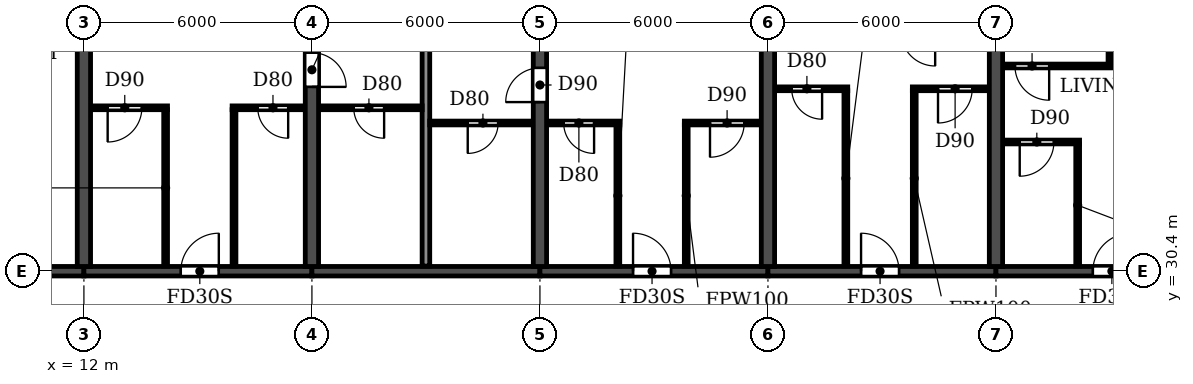
"""IFC4 building model, lengths in metres.
Left out: names, types, materials, properties, quantities, classifications, styles, units other than length and angle.
Written with IfcOpenShell. Run it as: python <this file> out.ifc"""

import sys

from ifc_helpers import new_model, si_unit, direction, frame, frame_2d, origin, place, context, subcontext, project, spatial, rectangle, extrude, element, fill, save


model = new_model("IFC4")
c1 = context("Model", 3, precision=1e-05, world=origin(), true_north=direction((0.0, 1.0)))
c2 = subcontext(c1, "Body", "Model", "MODEL_VIEW")
j1 = project(units=[si_unit("LENGTHUNIT", "METRE"), si_unit("PLANEANGLEUNIT", "RADIAN")], contexts=[c1])
p1 = place(None, origin())
s1 = spatial("IfcSite", under=j1, at=p1, CompositionType="ELEMENT")
p2 = place(p1, origin())
s2 = spatial("IfcBuilding", under=s1, at=p2, CompositionType="ELEMENT")
p3 = place(p2, frame((0.0, 0.0, 82.8)))
s3 = spatial("IfcBuildingStorey", under=s2, at=p3, CompositionType="ELEMENT", Elevation=82.8)
p4 = place(p3, frame((12.0, 30.525, 0.0), z_axis=(0.0, 0.0, 1.0), x_axis=(0.0, 1.0, 0.0)))
e1 = element("IfcWall", 1, at=p4, inside=s3, PredefinedType="SHEAR", context=c2, shape_type="SweptSolid", body=[
    extrude(rectangle(XDim=12.875, YDim=0.35, at=frame_2d((6.438, 0.0))), origin(), (0.0, 0.0, 1.0), 3.06),
])
p5 = place(p3, frame((18.0, 30.525, 0.0), z_axis=(0.0, 0.0, 1.0), x_axis=(0.0, 1.0, 0.0)))
e2 = element("IfcWall", 2, at=p5, inside=s3, PredefinedType="SHEAR", context=c2, shape_type="SweptSolid", body=[
    extrude(rectangle(XDim=12.875, YDim=0.35, at=frame_2d((6.438, 0.0))), origin(), (0.0, 0.0, 1.0), 3.06),
])
p6 = place(p5, frame((4.725, 0.0, 0.0)))
e3 = element("IfcOpeningElement", 3, at=p6, cuts=e2, PredefinedType="OPENING", context=c2, shape_type="SweptSolid", body=[
    extrude(rectangle(XDim=0.9, YDim=2.1, at=frame_2d((0.45, 1.05))), frame((0.0, 0.185, 0.0), z_axis=(0.0, -1.0, 0.0), x_axis=(1.0, 0.0, 0.0)), (0.0, 0.0, 1.0), 0.37),
])
p7 = place(p3, frame((24.0, 30.525, 0.0), z_axis=(0.0, 0.0, 1.0), x_axis=(0.0, 1.0, 0.0)))
e4 = element("IfcWall", 4, at=p7, inside=s3, PredefinedType="SHEAR", context=c2, shape_type="SweptSolid", body=[
    extrude(rectangle(XDim=12.875, YDim=0.35, at=frame_2d((6.438, 0.0))), origin(), (0.0, 0.0, 1.0), 3.06),
])
p8 = place(p7, frame((4.325, 0.0, 0.0)))
e5 = element("IfcOpeningElement", 5, at=p8, cuts=e4, PredefinedType="OPENING", context=c2, shape_type="SweptSolid", body=[
    extrude(rectangle(XDim=0.9, YDim=2.1, at=frame_2d((0.45, 1.05))), frame((0.0, 0.185, 0.0), z_axis=(0.0, -1.0, 0.0), x_axis=(1.0, 0.0, 0.0)), (0.0, 0.0, 1.0), 0.37),
])
for number, where, z_axis, x_axis in (
    (6, (30.0, 30.525, 0.0), (0.0, 0.0, 1.0), (0.0, 1.0, 0.0)),
    (7, (36.0, 30.525, 0.0), (0.0, 0.0, 1.0), (0.0, 1.0, 0.0)),
):
    element("IfcWall", number, at=place(p3, frame(where, z_axis=z_axis, x_axis=x_axis)), inside=s3, PredefinedType="SHEAR", context=c2, shape_type="SweptSolid", body=[
        extrude(rectangle(XDim=12.875, YDim=0.35, at=frame_2d((6.438, 0.0))), origin(), (0.0, 0.0, 1.0), 3.06),
    ])
p9 = place(p3, frame((6.2, 30.4, 0.0), z_axis=(0.0, 0.0, 1.0), x_axis=(1.0, 0.0, 0.0)))
e8 = element("IfcWall", 8, at=p9, inside=s3, PredefinedType="SHEAR", context=c2, shape_type="SweptSolid", body=[
    extrude(rectangle(XDim=5.8, YDim=0.25, at=frame_2d((2.9, 0.0))), origin(), (0.0, 0.0, 1.0), 2.46),
])
p10 = place(p9, frame((2.3, 0.0, 0.0)))
e9 = element("IfcOpeningElement", 9, at=p10, cuts=e8, PredefinedType="OPENING", context=c2, shape_type="SweptSolid", body=[
    extrude(rectangle(XDim=1.0, YDim=2.1, at=frame_2d((0.5, 1.05))), frame((0.0, 0.135, 0.0), z_axis=(0.0, -1.0, 0.0), x_axis=(1.0, 0.0, 0.0)), (0.0, 0.0, 1.0), 0.27),
])
p11 = place(p3, frame((12.0, 30.4, 0.0), z_axis=(0.0, 0.0, 1.0), x_axis=(1.0, 0.0, 0.0)))
e10 = element("IfcWall", 10, at=p11, inside=s3, PredefinedType="SHEAR", context=c2, shape_type="SweptSolid", body=[
    extrude(rectangle(XDim=6.0, YDim=0.25, at=frame_2d((3.0, 0.0))), origin(), (0.0, 0.0, 1.0), 2.46),
])
p12 = place(p11, frame((2.55, 0.0, 0.0)))
e11 = element("IfcOpeningElement", 11, at=p12, cuts=e10, PredefinedType="OPENING", context=c2, shape_type="SweptSolid", body=[
    extrude(rectangle(XDim=1.0, YDim=2.1, at=frame_2d((0.5, 1.05))), frame((0.0, 0.135, 0.0), z_axis=(0.0, -1.0, 0.0), x_axis=(1.0, 0.0, 0.0)), (0.0, 0.0, 1.0), 0.27),
])
p13 = place(p3, frame((18.0, 30.4, 0.0), z_axis=(0.0, 0.0, 1.0), x_axis=(1.0, 0.0, 0.0)))
e12 = element("IfcWall", 12, at=p13, inside=s3, PredefinedType="SHEAR", context=c2, shape_type="SweptSolid", body=[
    extrude(rectangle(XDim=6.0, YDim=0.25, at=frame_2d((3.0, 0.0))), origin(), (0.0, 0.0, 1.0), 2.46),
])
p14 = place(p3, frame((24.0, 30.4, 0.0), z_axis=(0.0, 0.0, 1.0), x_axis=(1.0, 0.0, 0.0)))
e13 = element("IfcWall", 13, at=p14, inside=s3, PredefinedType="SHEAR", context=c2, shape_type="SweptSolid", body=[
    extrude(rectangle(XDim=6.0, YDim=0.25, at=frame_2d((3.0, 0.0))), origin(), (0.0, 0.0, 1.0), 2.46),
])
p15 = place(p14, frame((2.45, 0.0, 0.0)))
e14 = element("IfcOpeningElement", 14, at=p15, cuts=e13, PredefinedType="OPENING", context=c2, shape_type="SweptSolid", body=[
    extrude(rectangle(XDim=1.0, YDim=2.1, at=frame_2d((0.5, 1.05))), frame((0.0, 0.135, 0.0), z_axis=(0.0, -1.0, 0.0), x_axis=(1.0, 0.0, 0.0)), (0.0, 0.0, 1.0), 0.27),
])
p16 = place(p3, frame((30.0, 30.4, 0.0), z_axis=(0.0, 0.0, 1.0), x_axis=(1.0, 0.0, 0.0)))
e15 = element("IfcWall", 15, at=p16, inside=s3, PredefinedType="SHEAR", context=c2, shape_type="SweptSolid", body=[
    extrude(rectangle(XDim=6.0, YDim=0.25, at=frame_2d((3.0, 0.0))), origin(), (0.0, 0.0, 1.0), 2.46),
])
p17 = place(p16, frame((2.45, 0.0, 0.0)))
e16 = element("IfcOpeningElement", 16, at=p17, cuts=e15, PredefinedType="OPENING", context=c2, shape_type="SweptSolid", body=[
    extrude(rectangle(XDim=1.0, YDim=2.1, at=frame_2d((0.5, 1.05))), frame((0.0, 0.135, 0.0), z_axis=(0.0, -1.0, 0.0), x_axis=(1.0, 0.0, 0.0)), (0.0, 0.0, 1.0), 0.27),
])
p18 = place(p3, frame((36.0, 30.4, 0.0), z_axis=(0.0, 0.0, 1.0), x_axis=(1.0, 0.0, 0.0)))
e17 = element("IfcWall", 17, at=p18, inside=s3, PredefinedType="SHEAR", context=c2, shape_type="SweptSolid", body=[
    extrude(rectangle(XDim=6.0, YDim=0.25, at=frame_2d((3.0, 0.0))), origin(), (0.0, 0.0, 1.0), 2.46),
])
p19 = place(p18, frame((2.55, 0.0, 0.0)))
e18 = element("IfcOpeningElement", 18, at=p19, cuts=e17, PredefinedType="OPENING", context=c2, shape_type="SweptSolid", body=[
    extrude(rectangle(XDim=1.0, YDim=2.1, at=frame_2d((0.5, 1.05))), frame((0.0, 0.135, 0.0), z_axis=(0.0, -1.0, 0.0), x_axis=(1.0, 0.0, 0.0)), (0.0, 0.0, 1.0), 0.27),
])
p20 = place(p3, frame((21.0, 30.535, 0.0), z_axis=(0.0, 0.0, 1.0), x_axis=(0.0, 1.0, 0.0)))
e19 = element("IfcWall", 19, at=p20, inside=s3, PredefinedType="PARTITIONING", context=c2, shape_type="SweptSolid", body=[
    extrude(rectangle(XDim=13.005, YDim=0.2, at=frame_2d((6.502, 0.0))), origin(), (0.0, 0.0, 1.0), 3.06),
])
p21 = place(p3, frame((36.185, 33.8, 0.0), z_axis=(0.0, 0.0, 1.0), x_axis=(1.0, 0.0, 0.0)))
e20 = element("IfcWall", 20, at=p21, inside=s3, PredefinedType="PARTITIONING", context=c2, shape_type="SweptSolid", body=[
    extrude(rectangle(XDim=2.015, YDim=0.1, at=frame_2d((1.007, 0.0))), origin(), (0.0, 0.0, 1.0), 3.06),
])
p22 = place(p21, frame((0.44, 0.0, 0.0)))
e21 = element("IfcOpeningElement", 21, at=p22, cuts=e20, PredefinedType="OPENING", context=c2, shape_type="SweptSolid", body=[
    extrude(rectangle(XDim=0.9, YDim=2.1, at=frame_2d((0.45, 1.05))), frame((0.0, 0.06, 0.0), z_axis=(0.0, -1.0, 0.0), x_axis=(1.0, 0.0, 0.0)), (0.0, 0.0, 1.0), 0.12),
])
p23 = place(p3, frame((21.1, 34.3, 0.0), z_axis=(0.0, 0.0, 1.0), x_axis=(1.0, 0.0, 0.0)))
e22 = element("IfcWall", 22, at=p23, inside=s3, PredefinedType="PARTITIONING", context=c2, shape_type="SweptSolid", body=[
    extrude(rectangle(XDim=2.715, YDim=0.1, at=frame_2d((1.357, 0.0))), origin(), (0.0, 0.0, 1.0), 3.06),
])
p24 = place(p23, frame((1.0, 0.0, 0.0)))
e23 = element("IfcOpeningElement", 23, at=p24, cuts=e22, PredefinedType="OPENING", context=c2, shape_type="SweptSolid", body=[
    extrude(rectangle(XDim=0.8, YDim=2.1, at=frame_2d((0.4, 1.05))), frame((0.0, 0.06, 0.0), z_axis=(0.0, -1.0, 0.0), x_axis=(1.0, 0.0, 0.0)), (0.0, 0.0, 1.0), 0.12),
])
p25 = place(p3, frame((24.185, 34.3, 0.0), z_axis=(0.0, 0.0, 1.0), x_axis=(1.0, 0.0, 0.0)))
e24 = element("IfcWall", 24, at=p25, inside=s3, PredefinedType="PARTITIONING", context=c2, shape_type="SweptSolid", body=[
    extrude(rectangle(XDim=1.915, YDim=0.1, at=frame_2d((0.958, 0.0))), origin(), (0.0, 0.0, 1.0), 3.06),
])
p26 = place(p25, frame((0.44, 0.0, 0.0)))
e25 = element("IfcOpeningElement", 25, at=p26, cuts=e24, PredefinedType="OPENING", context=c2, shape_type="SweptSolid", body=[
    extrude(rectangle(XDim=0.8, YDim=2.1, at=frame_2d((0.4, 1.05))), frame((0.0, 0.06, 0.0), z_axis=(0.0, -1.0, 0.0), x_axis=(1.0, 0.0, 0.0)), (0.0, 0.0, 1.0), 0.12),
])
p27 = place(p3, frame((27.8, 34.3, 0.0), z_axis=(0.0, 0.0, 1.0), x_axis=(1.0, 0.0, 0.0)))
e26 = element("IfcWall", 26, at=p27, inside=s3, PredefinedType="PARTITIONING", context=c2, shape_type="SweptSolid", body=[
    extrude(rectangle(XDim=2.015, YDim=0.1, at=frame_2d((1.007, 0.0))), origin(), (0.0, 0.0, 1.0), 3.06),
])
p28 = place(p27, frame((0.675, 0.0, 0.0)))
e27 = element("IfcOpeningElement", 27, at=p28, cuts=e26, PredefinedType="OPENING", context=c2, shape_type="SweptSolid", body=[
    extrude(rectangle(XDim=0.9, YDim=2.1, at=frame_2d((0.45, 1.05))), frame((0.0, 0.06, 0.0), z_axis=(0.0, -1.0, 0.0), x_axis=(1.0, 0.0, 0.0)), (0.0, 0.0, 1.0), 0.12),
])
p29 = place(p3, frame((12.185, 34.7, 0.0), z_axis=(0.0, 0.0, 1.0), x_axis=(1.0, 0.0, 0.0)))
e28 = element("IfcWall", 28, at=p29, inside=s3, PredefinedType="PARTITIONING", context=c2, shape_type="SweptSolid", body=[
    extrude(rectangle(XDim=2.015, YDim=0.1, at=frame_2d((1.007, 0.0))), origin(), (0.0, 0.0, 1.0), 3.06),
])
p30 = place(p29, frame((0.44, 0.0, 0.0)))
e29 = element("IfcOpeningElement", 29, at=p30, cuts=e28, PredefinedType="OPENING", context=c2, shape_type="SweptSolid", body=[
    extrude(rectangle(XDim=0.9, YDim=2.1, at=frame_2d((0.45, 1.05))), frame((0.0, 0.06, 0.0), z_axis=(0.0, -1.0, 0.0), x_axis=(1.0, 0.0, 0.0)), (0.0, 0.0, 1.0), 0.12),
])
p31 = place(p3, frame((15.9, 34.7, 0.0), z_axis=(0.0, 0.0, 1.0), x_axis=(1.0, 0.0, 0.0)))
e30 = element("IfcWall", 30, at=p31, inside=s3, PredefinedType="PARTITIONING", context=c2, shape_type="SweptSolid", body=[
    extrude(rectangle(XDim=1.915, YDim=0.1, at=frame_2d((0.958, 0.0))), origin(), (0.0, 0.0, 1.0), 3.06),
])
p32 = place(p31, frame((0.675, 0.0, 0.0)))
e31 = element("IfcOpeningElement", 31, at=p32, cuts=e30, PredefinedType="OPENING", context=c2, shape_type="SweptSolid", body=[
    extrude(rectangle(XDim=0.8, YDim=2.1, at=frame_2d((0.4, 1.05))), frame((0.0, 0.06, 0.0), z_axis=(0.0, -1.0, 0.0), x_axis=(1.0, 0.0, 0.0)), (0.0, 0.0, 1.0), 0.12),
])
p33 = place(p3, frame((18.185, 34.7, 0.0), z_axis=(0.0, 0.0, 1.0), x_axis=(1.0, 0.0, 0.0)))
e32 = element("IfcWall", 32, at=p33, inside=s3, PredefinedType="PARTITIONING", context=c2, shape_type="SweptSolid", body=[
    extrude(rectangle(XDim=2.715, YDim=0.1, at=frame_2d((1.357, 0.0))), origin(), (0.0, 0.0, 1.0), 3.06),
])
p34 = place(p33, frame((0.915, 0.0, 0.0)))
e33 = element("IfcOpeningElement", 33, at=p34, cuts=e32, PredefinedType="OPENING", context=c2, shape_type="SweptSolid", body=[
    extrude(rectangle(XDim=0.8, YDim=2.1, at=frame_2d((0.4, 1.05))), frame((0.0, 0.06, 0.0), z_axis=(0.0, -1.0, 0.0), x_axis=(1.0, 0.0, 0.0)), (0.0, 0.0, 1.0), 0.12),
])
p35 = place(p3, frame((30.185, 35.2, 0.0), z_axis=(0.0, 0.0, 1.0), x_axis=(1.0, 0.0, 0.0)))
e34 = element("IfcWall", 34, at=p35, inside=s3, PredefinedType="PARTITIONING", context=c2, shape_type="SweptSolid", body=[
    extrude(rectangle(XDim=1.915, YDim=0.1, at=frame_2d((0.958, 0.0))), origin(), (0.0, 0.0, 1.0), 3.06),
])
p36 = place(p35, frame((0.44, 0.0, 0.0)))
e35 = element("IfcOpeningElement", 35, at=p36, cuts=e34, PredefinedType="OPENING", context=c2, shape_type="SweptSolid", body=[
    extrude(rectangle(XDim=0.8, YDim=2.1, at=frame_2d((0.4, 1.05))), frame((0.0, 0.06, 0.0), z_axis=(0.0, -1.0, 0.0), x_axis=(1.0, 0.0, 0.0)), (0.0, 0.0, 1.0), 0.12),
])
p37 = place(p3, frame((33.8, 35.2, 0.0), z_axis=(0.0, 0.0, 1.0), x_axis=(1.0, 0.0, 0.0)))
e36 = element("IfcWall", 36, at=p37, inside=s3, PredefinedType="PARTITIONING", context=c2, shape_type="SweptSolid", body=[
    extrude(rectangle(XDim=2.015, YDim=0.1, at=frame_2d((1.007, 0.0))), origin(), (0.0, 0.0, 1.0), 3.06),
])
p38 = place(p37, frame((0.675, 0.0, 0.0)))
e37 = element("IfcOpeningElement", 37, at=p38, cuts=e36, PredefinedType="OPENING", context=c2, shape_type="SweptSolid", body=[
    extrude(rectangle(XDim=0.9, YDim=2.1, at=frame_2d((0.45, 1.05))), frame((0.0, 0.06, 0.0), z_axis=(0.0, -1.0, 0.0), x_axis=(1.0, 0.0, 0.0)), (0.0, 0.0, 1.0), 0.12),
])
p39 = place(p3, frame((36.185, 35.8, 0.0), z_axis=(0.0, 0.0, 1.0), x_axis=(1.0, 0.0, 0.0)))
e38 = element("IfcWall", 38, at=p39, inside=s3, PredefinedType="PARTITIONING", context=c2, shape_type="SweptSolid", body=[
    extrude(rectangle(XDim=2.865, YDim=0.1, at=frame_2d((1.433, 0.0))), origin(), (0.0, 0.0, 1.0), 3.06),
])
p40 = place(p39, frame((0.315, 0.0, 0.0)))
e39 = element("IfcOpeningElement", 39, at=p40, cuts=e38, PredefinedType="OPENING", context=c2, shape_type="SweptSolid", body=[
    extrude(rectangle(XDim=0.9, YDim=2.1, at=frame_2d((0.45, 1.05))), frame((0.0, 0.06, 0.0), z_axis=(0.0, -1.0, 0.0), x_axis=(1.0, 0.0, 0.0)), (0.0, 0.0, 1.0), 0.12),
])
for number, where, z_axis, x_axis in (
    (40, (14.15, 30.535, 0.0), (0.0, 0.0, 1.0), (0.0, 1.0, 0.0)),
    (41, (15.95, 30.535, 0.0), (0.0, 0.0, 1.0), (0.0, 1.0, 0.0)),
):
    element("IfcWall", number, at=place(p3, frame(where, z_axis=z_axis, x_axis=x_axis)), inside=s3, PredefinedType="PARTITIONING", context=c2, shape_type="SweptSolid", body=[
        extrude(rectangle(XDim=4.115, YDim=0.1, at=frame_2d((2.058, 0.0))), origin(), (0.0, 0.0, 1.0), 3.06),
    ])
for number, where, z_axis, x_axis in (
    (42, (26.05, 30.535, 0.0), (0.0, 0.0, 1.0), (0.0, 1.0, 0.0)),
    (43, (27.85, 30.535, 0.0), (0.0, 0.0, 1.0), (0.0, 1.0, 0.0)),
):
    element("IfcWall", number, at=place(p3, frame(where, z_axis=z_axis, x_axis=x_axis)), inside=s3, PredefinedType="PARTITIONING", context=c2, shape_type="SweptSolid", body=[
        extrude(rectangle(XDim=3.715, YDim=0.1, at=frame_2d((1.857, 0.0))), origin(), (0.0, 0.0, 1.0), 3.06),
    ])
for number, where, z_axis, x_axis in (
    (44, (32.05, 30.535, 0.0), (0.0, 0.0, 1.0), (0.0, 1.0, 0.0)),
    (45, (33.85, 30.535, 0.0), (0.0, 0.0, 1.0), (0.0, 1.0, 0.0)),
):
    element("IfcWall", number, at=place(p3, frame(where, z_axis=z_axis, x_axis=x_axis)), inside=s3, PredefinedType="PARTITIONING", context=c2, shape_type="SweptSolid", body=[
        extrude(rectangle(XDim=4.615, YDim=0.1, at=frame_2d((2.308, 0.0))), origin(), (0.0, 0.0, 1.0), 3.06),
    ])
p41 = place(p3, frame((38.15, 30.535, 0.0), z_axis=(0.0, 0.0, 1.0), x_axis=(0.0, 1.0, 0.0)))
e46 = element("IfcWall", 46, at=p41, inside=s3, PredefinedType="PARTITIONING", context=c2, shape_type="SweptSolid", body=[
    extrude(rectangle(XDim=3.215, YDim=0.1, at=frame_2d((1.607, 0.0))), origin(), (0.0, 0.0, 1.0), 3.06),
])
p42 = place(p3, frame((39.0, 35.85, 0.0), z_axis=(0.0, 0.0, 1.0), x_axis=(0.0, 1.0, 0.0)))
e47 = element("IfcWall", 47, at=p42, inside=s3, PredefinedType="PARTITIONING", context=c2, shape_type="SweptSolid", body=[
    extrude(rectangle(XDim=7.69, YDim=0.1, at=frame_2d((3.845, 0.0))), origin(), (0.0, 0.0, 1.0), 3.06),
])
p43 = place(p34, frame((0.8, 0.0, 0.0), z_axis=(0.0, 0.0, 1.0), x_axis=(-1.0, 0.0, 0.0)))
e48 = element("IfcDoor", 48, at=p43, inside=s3, OperationType="SINGLE_SWING_LEFT", PredefinedType="DOOR", context=c2, shape_type="SweptSolid", body=[
    extrude(rectangle(XDim=0.8, YDim=2.1, at=frame_2d((0.4, 1.05))), frame((0.0, 0.025, 0.0), z_axis=(0.0, -1.0, 0.0), x_axis=(1.0, 0.0, 0.0)), (0.0, 0.0, 1.0), 0.05),
])
fill(e33, e48)
p44 = place(p30, frame((0.9, 0.0, 0.0), z_axis=(0.0, 0.0, 1.0), x_axis=(-1.0, 0.0, 0.0)))
e49 = element("IfcDoor", 49, at=p44, inside=s3, OperationType="SINGLE_SWING_RIGHT", PredefinedType="DOOR", context=c2, shape_type="SweptSolid", body=[
    extrude(rectangle(XDim=0.9, YDim=2.1, at=frame_2d((0.45, 1.05))), frame((0.0, 0.025, 0.0), z_axis=(0.0, -1.0, 0.0), x_axis=(1.0, 0.0, 0.0)), (0.0, 0.0, 1.0), 0.05),
])
fill(e29, e49)
p45 = place(p12, origin())
e50 = element("IfcDoor", 50, at=p45, inside=s3, OperationType="SINGLE_SWING_RIGHT", PredefinedType="DOOR", context=c2, shape_type="SweptSolid", body=[
    extrude(rectangle(XDim=1.0, YDim=2.1, at=frame_2d((0.5, 1.05))), frame((0.0, 0.025, 0.0), z_axis=(0.0, -1.0, 0.0), x_axis=(1.0, 0.0, 0.0)), (0.0, 0.0, 1.0), 0.05),
])
fill(e11, e50)
p46 = place(p32, frame((0.8, 0.0, 0.0), z_axis=(0.0, 0.0, 1.0), x_axis=(-1.0, 0.0, 0.0)))
e51 = element("IfcDoor", 51, at=p46, inside=s3, OperationType="SINGLE_SWING_LEFT", PredefinedType="DOOR", context=c2, shape_type="SweptSolid", body=[
    extrude(rectangle(XDim=0.8, YDim=2.1, at=frame_2d((0.4, 1.05))), frame((0.0, 0.025, 0.0), z_axis=(0.0, -1.0, 0.0), x_axis=(1.0, 0.0, 0.0)), (0.0, 0.0, 1.0), 0.05),
])
fill(e31, e51)
p47 = place(p6, frame((0.9, 0.0, 0.0), z_axis=(0.0, 0.0, 1.0), x_axis=(-1.0, 0.0, 0.0)))
e52 = element("IfcDoor", 52, at=p47, inside=s3, OperationType="SINGLE_SWING_RIGHT", PredefinedType="DOOR", context=c2, shape_type="SweptSolid", body=[
    extrude(rectangle(XDim=0.9, YDim=2.1, at=frame_2d((0.45, 1.05))), frame((0.0, 0.025, 0.0), z_axis=(0.0, -1.0, 0.0), x_axis=(1.0, 0.0, 0.0)), (0.0, 0.0, 1.0), 0.05),
])
fill(e3, e52)
p48 = place(p24, frame((0.8, 0.0, 0.0), z_axis=(0.0, 0.0, 1.0), x_axis=(-1.0, 0.0, 0.0)))
e53 = element("IfcDoor", 53, at=p48, inside=s3, OperationType="SINGLE_SWING_RIGHT", PredefinedType="DOOR", context=c2, shape_type="SweptSolid", body=[
    extrude(rectangle(XDim=0.8, YDim=2.1, at=frame_2d((0.4, 1.05))), frame((0.0, 0.025, 0.0), z_axis=(0.0, -1.0, 0.0), x_axis=(1.0, 0.0, 0.0)), (0.0, 0.0, 1.0), 0.05),
])
fill(e23, e53)
p49 = place(p8, origin())
e54 = element("IfcDoor", 54, at=p49, inside=s3, OperationType="SINGLE_SWING_LEFT", PredefinedType="DOOR", context=c2, shape_type="SweptSolid", body=[
    extrude(rectangle(XDim=0.9, YDim=2.1, at=frame_2d((0.45, 1.05))), frame((0.0, 0.025, 0.0), z_axis=(0.0, -1.0, 0.0), x_axis=(1.0, 0.0, 0.0)), (0.0, 0.0, 1.0), 0.05),
])
fill(e5, e54)
p50 = place(p26, frame((0.8, 0.0, 0.0), z_axis=(0.0, 0.0, 1.0), x_axis=(-1.0, 0.0, 0.0)))
e55 = element("IfcDoor", 55, at=p50, inside=s3, OperationType="SINGLE_SWING_LEFT", PredefinedType="DOOR", context=c2, shape_type="SweptSolid", body=[
    extrude(rectangle(XDim=0.8, YDim=2.1, at=frame_2d((0.4, 1.05))), frame((0.0, 0.025, 0.0), z_axis=(0.0, -1.0, 0.0), x_axis=(1.0, 0.0, 0.0)), (0.0, 0.0, 1.0), 0.05),
])
fill(e25, e55)
p51 = place(p15, origin())
e56 = element("IfcDoor", 56, at=p51, inside=s3, OperationType="SINGLE_SWING_LEFT", PredefinedType="DOOR", context=c2, shape_type="SweptSolid", body=[
    extrude(rectangle(XDim=1.0, YDim=2.1, at=frame_2d((0.5, 1.05))), frame((0.0, 0.025, 0.0), z_axis=(0.0, -1.0, 0.0), x_axis=(1.0, 0.0, 0.0)), (0.0, 0.0, 1.0), 0.05),
])
fill(e14, e56)
p52 = place(p28, frame((0.9, 0.0, 0.0), z_axis=(0.0, 0.0, 1.0), x_axis=(-1.0, 0.0, 0.0)))
e57 = element("IfcDoor", 57, at=p52, inside=s3, OperationType="SINGLE_SWING_RIGHT", PredefinedType="DOOR", context=c2, shape_type="SweptSolid", body=[
    extrude(rectangle(XDim=0.9, YDim=2.1, at=frame_2d((0.45, 1.05))), frame((0.0, 0.025, 0.0), z_axis=(0.0, -1.0, 0.0), x_axis=(1.0, 0.0, 0.0)), (0.0, 0.0, 1.0), 0.05),
])
fill(e27, e57)
p53 = place(p36, frame((0.8, 0.0, 0.0), z_axis=(0.0, 0.0, 1.0), x_axis=(-1.0, 0.0, 0.0)))
e58 = element("IfcDoor", 58, at=p53, inside=s3, OperationType="SINGLE_SWING_LEFT", PredefinedType="DOOR", context=c2, shape_type="SweptSolid", body=[
    extrude(rectangle(XDim=0.8, YDim=2.1, at=frame_2d((0.4, 1.05))), frame((0.0, 0.025, 0.0), z_axis=(0.0, -1.0, 0.0), x_axis=(1.0, 0.0, 0.0)), (0.0, 0.0, 1.0), 0.05),
])
fill(e35, e58)
p54 = place(p17, origin())
e59 = element("IfcDoor", 59, at=p54, inside=s3, OperationType="SINGLE_SWING_LEFT", PredefinedType="DOOR", context=c2, shape_type="SweptSolid", body=[
    extrude(rectangle(XDim=1.0, YDim=2.1, at=frame_2d((0.5, 1.05))), frame((0.0, 0.025, 0.0), z_axis=(0.0, -1.0, 0.0), x_axis=(1.0, 0.0, 0.0)), (0.0, 0.0, 1.0), 0.05),
])
fill(e16, e59)
p55 = place(p38, frame((0.9, 0.0, 0.0), z_axis=(0.0, 0.0, 1.0), x_axis=(-1.0, 0.0, 0.0)))
e60 = element("IfcDoor", 60, at=p55, inside=s3, OperationType="SINGLE_SWING_RIGHT", PredefinedType="DOOR", context=c2, shape_type="SweptSolid", body=[
    extrude(rectangle(XDim=0.9, YDim=2.1, at=frame_2d((0.45, 1.05))), frame((0.0, 0.025, 0.0), z_axis=(0.0, -1.0, 0.0), x_axis=(1.0, 0.0, 0.0)), (0.0, 0.0, 1.0), 0.05),
])
fill(e37, e60)
p56 = place(p40, frame((0.9, 0.0, 0.0), z_axis=(0.0, 0.0, 1.0), x_axis=(-1.0, 0.0, 0.0)))
e61 = element("IfcDoor", 61, at=p56, inside=s3, OperationType="SINGLE_SWING_LEFT", PredefinedType="DOOR", context=c2, shape_type="SweptSolid", body=[
    extrude(rectangle(XDim=0.9, YDim=2.1, at=frame_2d((0.45, 1.05))), frame((0.0, 0.025, 0.0), z_axis=(0.0, -1.0, 0.0), x_axis=(1.0, 0.0, 0.0)), (0.0, 0.0, 1.0), 0.05),
])
fill(e39, e61)
p57 = place(p22, frame((0.9, 0.0, 0.0), z_axis=(0.0, 0.0, 1.0), x_axis=(-1.0, 0.0, 0.0)))
e62 = element("IfcDoor", 62, at=p57, inside=s3, OperationType="SINGLE_SWING_RIGHT", PredefinedType="DOOR", context=c2, shape_type="SweptSolid", body=[
    extrude(rectangle(XDim=0.9, YDim=2.1, at=frame_2d((0.45, 1.05))), frame((0.0, 0.025, 0.0), z_axis=(0.0, -1.0, 0.0), x_axis=(1.0, 0.0, 0.0)), (0.0, 0.0, 1.0), 0.05),
])
fill(e21, e62)
p58 = place(p19, origin())
e63 = element("IfcDoor", 63, at=p58, inside=s3, OperationType="SINGLE_SWING_RIGHT", PredefinedType="DOOR", context=c2, shape_type="SweptSolid", body=[
    extrude(rectangle(XDim=1.0, YDim=2.1, at=frame_2d((0.5, 1.05))), frame((0.0, 0.025, 0.0), z_axis=(0.0, -1.0, 0.0), x_axis=(1.0, 0.0, 0.0)), (0.0, 0.0, 1.0), 0.05),
])
fill(e18, e63)
save(model, sys.argv[1])
